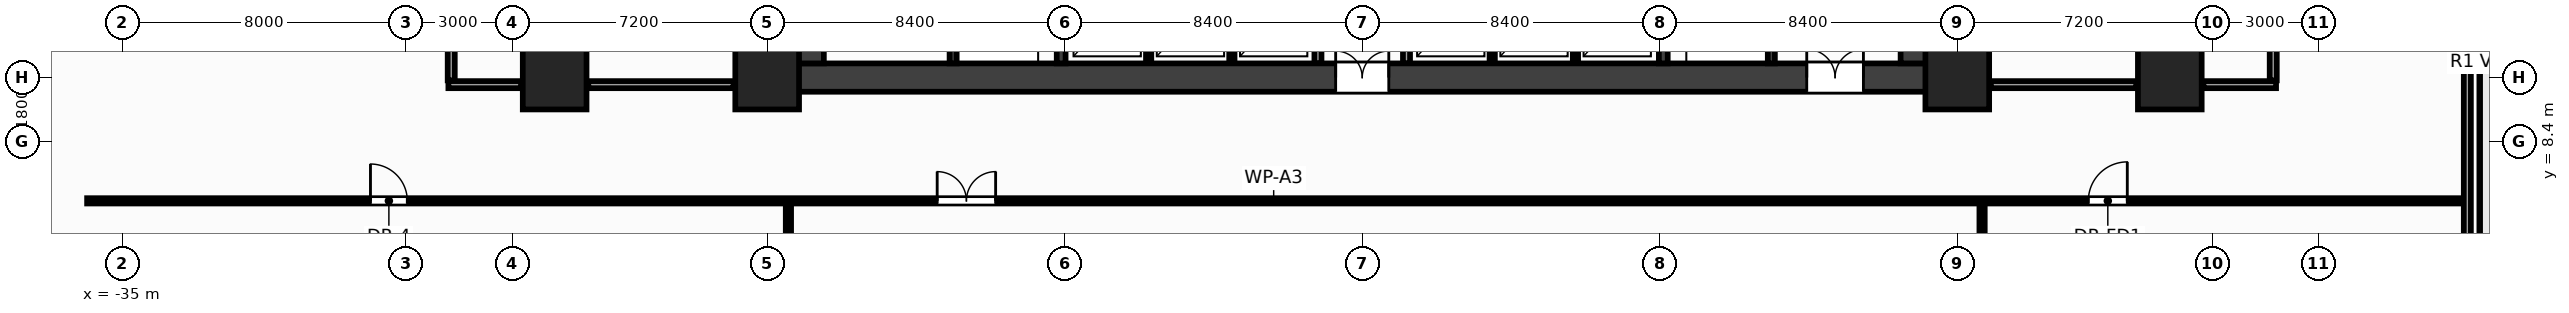
"""IFC4 building model, lengths in metres.
Left out: names, types, materials, properties, quantities, classifications, styles, units other than length and angle.
Written with IfcOpenShell. Run it as: python <this file> out.ifc"""

import sys

from ifc_helpers import new_model, si_unit, direction, frame, frame_2d, origin, origin_2d, place, context, subcontext, project, spatial, rectangle, extrude, source, transform, mapped, element, fill, save


model = new_model("IFC4")
c1 = context("Model", 3, precision=1e-05, world=origin(), true_north=direction((0.0, 1.0)))
c2 = subcontext(c1, "Body", "Model", "MODEL_VIEW")
j1 = project(units=[si_unit("LENGTHUNIT", "METRE"), si_unit("PLANEANGLEUNIT", "RADIAN")], contexts=[c1])
p1 = place(None, origin())
s1 = spatial("IfcSite", under=j1, at=p1, CompositionType="ELEMENT")
p2 = place(p1, origin())
s2 = spatial("IfcBuilding", under=s1, at=p2, CompositionType="ELEMENT")
p3 = place(p2, origin())
s3 = spatial("IfcBuildingStorey", under=s2, at=p3, CompositionType="ELEMENT", Elevation=0.0)
m1 = source(origin(), c2, "Body", "SweptSolid", [
    extrude(rectangle(XDim=32.0, YDim=0.8, at=frame_2d((16.0, 0.0))), origin(), (0.0, 0.0, 1.0), 5.0),
])
p4 = place(p3, frame((-16.0, 10.2, 0.0), z_axis=(0.0, 0.0, 1.0), x_axis=(1.0, 0.0, 0.0)))
e1 = element("IfcWall", 1, at=p4, inside=s3, PredefinedType="SHEAR", context=c2, shape_type="MappedRepresentation", body=[
    mapped(m1, transform((0.0, 0.0, 0.0), x_axis=(1.0, 0.0, 0.0), y_axis=(0.0, 1.0, 0.0), z_axis=(0.0, 0.0, 1.0), scale=1.0)),
])
p5 = place(p4, frame((28.55, 0.0, 0.0)))
e2 = element("IfcOpeningElement", 2, at=p5, cuts=e1, PredefinedType="OPENING", context=c2, shape_type="SweptSolid", body=[
    extrude(rectangle(XDim=1.6, YDim=2.15, at=frame_2d((0.8, 1.075))), frame((0.0, 0.412, 0.0), z_axis=(0.0, -1.0, 0.0), x_axis=(1.0, 0.0, 0.0)), (0.0, 0.0, 1.0), 0.824),
])
p6 = place(p4, frame((15.25, 0.0, 0.0)))
e3 = element("IfcOpeningElement", 3, at=p6, cuts=e1, PredefinedType="OPENING", context=c2, shape_type="SweptSolid", body=[
    extrude(rectangle(XDim=1.5, YDim=2.2, at=frame_2d((0.75, 1.1))), frame((0.0, 0.412, 0.0), z_axis=(0.0, -1.0, 0.0), x_axis=(1.0, 0.0, 0.0)), (0.0, 0.0, 1.0), 0.824),
])
m2 = source(origin(), c2, "Body", "SweptSolid", [
    extrude(rectangle(XDim=12.8, YDim=0.8, at=frame_2d((6.4, 0.0))), origin(), (0.0, 0.0, 1.0), 5.0),
])
p7 = place(p3, frame((-15.6, 10.6, 0.0), z_axis=(0.0, 0.0, 1.0), x_axis=(0.0, 1.0, 0.0)))
e4 = element("IfcWall", 4, at=p7, inside=s3, PredefinedType="SHEAR", context=c2, shape_type="MappedRepresentation", body=[
    mapped(m2, transform((0.0, 0.0, 0.0), x_axis=(1.0, 0.0, 0.0), y_axis=(0.0, 1.0, 0.0), z_axis=(0.0, 0.0, 1.0), scale=1.0)),
])
p8 = place(p7, frame((0.55, 0.0, 0.0)))
e5 = element("IfcOpeningElement", 5, at=p8, cuts=e4, PredefinedType="OPENING", context=c2, shape_type="SweptSolid", body=[
    extrude(rectangle(XDim=1.6, YDim=2.15, at=frame_2d((0.8, 1.075))), frame((0.0, 0.412, 0.0), z_axis=(0.0, -1.0, 0.0), x_axis=(1.0, 0.0, 0.0)), (0.0, 0.0, 1.0), 0.824),
])
p9 = place(p3, frame((15.6, 10.6, 0.0), z_axis=(0.0, 0.0, 1.0), x_axis=(0.0, 1.0, 0.0)))
e6 = element("IfcWall", 6, at=p9, inside=s3, PredefinedType="SHEAR", context=c2, shape_type="MappedRepresentation", body=[
    mapped(m2, transform((0.0, 0.0, 0.0), x_axis=(1.0, 0.0, 0.0), y_axis=(0.0, 1.0, 0.0), z_axis=(0.0, 0.0, 1.0), scale=1.0)),
])
p10 = place(p9, frame((0.55, 0.0, 0.0)))
e7 = element("IfcOpeningElement", 7, at=p10, cuts=e6, PredefinedType="OPENING", context=c2, shape_type="SweptSolid", body=[
    extrude(rectangle(XDim=1.6, YDim=2.15, at=frame_2d((0.8, 1.075))), frame((0.0, 0.412, 0.0), z_axis=(0.0, -1.0, 0.0), x_axis=(1.0, 0.0, 0.0)), (0.0, 0.0, 1.0), 0.824),
])
m3 = source(origin(), c2, "Body", "SweptSolid", [
    extrude(rectangle(XDim=12.8, YDim=0.25, at=frame_2d((6.4, 0.0))), origin(), (0.0, 0.0, 1.0), 5.0),
])
p11 = place(p3, frame((-8.5, 10.6, 0.0), z_axis=(0.0, 0.0, 1.0), x_axis=(0.0, 1.0, 0.0)))
e8 = element("IfcWall", 8, at=p11, inside=s3, PredefinedType="SHEAR", context=c2, shape_type="MappedRepresentation", body=[
    mapped(m3, transform((0.0, 0.0, 0.0), x_axis=(1.0, 0.0, 0.0), y_axis=(0.0, 1.0, 0.0), z_axis=(0.0, 0.0, 1.0), scale=1.0)),
])
p12 = place(p11, frame((5.0, 0.0, 0.0)))
e9 = element("IfcOpeningElement", 9, at=p12, cuts=e8, PredefinedType="OPENING", context=c2, shape_type="SweptSolid", body=[
    extrude(rectangle(XDim=0.95, YDim=2.15, at=frame_2d((0.475, 1.075))), frame((0.0, 0.137, 0.0), z_axis=(0.0, -1.0, 0.0), x_axis=(1.0, 0.0, 0.0)), (0.0, 0.0, 1.0), 0.274),
])
p13 = place(p11, frame((8.1, 0.0, 0.0)))
e10 = element("IfcOpeningElement", 10, at=p13, cuts=e8, PredefinedType="OPENING", context=c2, shape_type="SweptSolid", body=[
    extrude(rectangle(XDim=0.95, YDim=2.15, at=frame_2d((0.475, 1.075))), frame((0.0, 0.137, 0.0), z_axis=(0.0, -1.0, 0.0), x_axis=(1.0, 0.0, 0.0)), (0.0, 0.0, 1.0), 0.274),
])
p14 = place(p3, frame((8.5, 10.6, 0.0), z_axis=(0.0, 0.0, 1.0), x_axis=(0.0, 1.0, 0.0)))
e11 = element("IfcWall", 11, at=p14, inside=s3, PredefinedType="SHEAR", context=c2, shape_type="MappedRepresentation", body=[
    mapped(m3, transform((0.0, 0.0, 0.0), x_axis=(1.0, 0.0, 0.0), y_axis=(0.0, 1.0, 0.0), z_axis=(0.0, 0.0, 1.0), scale=1.0)),
])
p15 = place(p14, frame((4.4, 0.0, 0.0)))
e12 = element("IfcOpeningElement", 12, at=p15, cuts=e11, PredefinedType="OPENING", context=c2, shape_type="SweptSolid", body=[
    extrude(rectangle(XDim=1.1, YDim=2.15, at=frame_2d((0.55, 1.075))), frame((0.0, 0.137, 0.0), z_axis=(0.0, -1.0, 0.0), x_axis=(1.0, 0.0, 0.0)), (0.0, 0.0, 1.0), 0.274),
])
p16 = place(p14, frame((6.95, 0.0, 0.0)))
e13 = element("IfcOpeningElement", 13, at=p16, cuts=e11, PredefinedType="OPENING", context=c2, shape_type="SweptSolid", body=[
    extrude(rectangle(XDim=1.1, YDim=2.15, at=frame_2d((0.55, 1.075))), frame((0.0, 0.137, 0.0), z_axis=(0.0, -1.0, 0.0), x_axis=(1.0, 0.0, 0.0)), (0.0, 0.0, 1.0), 0.274),
])
p17 = place(p14, frame((9.85, 0.0, 0.0)))
e14 = element("IfcOpeningElement", 14, at=p17, cuts=e11, PredefinedType="OPENING", context=c2, shape_type="SweptSolid", body=[
    extrude(rectangle(XDim=0.95, YDim=2.15, at=frame_2d((0.475, 1.075))), frame((0.0, 0.137, 0.0), z_axis=(0.0, -1.0, 0.0), x_axis=(1.0, 0.0, 0.0)), (0.0, 0.0, 1.0), 0.274),
])
m4 = source(origin(), c2, "Body", "SweptSolid", [
    extrude(rectangle(XDim=3.05, YDim=0.2, at=frame_2d((1.525, 0.0))), origin(), (0.0, 0.0, 1.0), 5.0),
])
p18 = place(p3, frame((-11.55, 10.6, 0.0), z_axis=(0.0, 0.0, 1.0), x_axis=(0.0, 1.0, 0.0)))
e15 = element("IfcWall", 15, at=p18, inside=s3, PredefinedType="SHEAR", context=c2, shape_type="MappedRepresentation", body=[
    mapped(m4, transform((0.0, 0.0, 0.0), x_axis=(1.0, 0.0, 0.0), y_axis=(0.0, 1.0, 0.0), z_axis=(0.0, 0.0, 1.0), scale=1.0)),
])
p19 = place(p18, frame((0.9, 0.0, 0.0)))
e16 = element("IfcOpeningElement", 16, at=p19, cuts=e15, PredefinedType="OPENING", context=c2, shape_type="SweptSolid", body=[
    extrude(rectangle(XDim=1.1, YDim=2.15, at=frame_2d((0.55, 1.075))), frame((0.0, 0.112, 0.0), z_axis=(0.0, -1.0, 0.0), x_axis=(1.0, 0.0, 0.0)), (0.0, 0.0, 1.0), 0.224),
])
p20 = place(p3, frame((11.55, 10.6, 0.0), z_axis=(0.0, 0.0, 1.0), x_axis=(0.0, 1.0, 0.0)))
e17 = element("IfcWall", 17, at=p20, inside=s3, PredefinedType="SHEAR", context=c2, shape_type="MappedRepresentation", body=[
    mapped(m4, transform((0.0, 0.0, 0.0), x_axis=(1.0, 0.0, 0.0), y_axis=(0.0, 1.0, 0.0), z_axis=(0.0, 0.0, 1.0), scale=1.0)),
])
p21 = place(p20, frame((0.9, 0.0, 0.0)))
e18 = element("IfcOpeningElement", 18, at=p21, cuts=e17, PredefinedType="OPENING", context=c2, shape_type="SweptSolid", body=[
    extrude(rectangle(XDim=1.1, YDim=2.15, at=frame_2d((0.55, 1.075))), frame((0.0, 0.112, 0.0), z_axis=(0.0, -1.0, 0.0), x_axis=(1.0, 0.0, 0.0)), (0.0, 0.0, 1.0), 0.224),
])
m5 = source(origin(), c2, "Body", "SweptSolid", [
    extrude(rectangle(XDim=1.8, YDim=1.8, at=origin_2d()), origin(), (0.0, 0.0, 1.0), 5.0),
])
for number, where, z_axis, x_axis in (
    (19, (-16.8, 10.2, 0.0), (0.0, 0.0, 1.0), (1.0, 0.0, 0.0)),
    (20, (16.8, 10.2, 0.0), (0.0, 0.0, 1.0), (1.0, 0.0, 0.0)),
    (21, (-22.8, 10.2, 0.0), (0.0, 0.0, 1.0), (1.0, 0.0, 0.0)),
    (22, (22.8, 10.2, 0.0), (0.0, 0.0, 1.0), (1.0, 0.0, 0.0)),
):
    element("IfcColumn", number, at=place(p3, frame(where, z_axis=z_axis, x_axis=x_axis)), inside=s3, PredefinedType="COLUMN", context=c2, shape_type="MappedRepresentation", body=[
        mapped(m5, transform((0.0, 0.0, 0.0), x_axis=(1.0, 0.0, 0.0), y_axis=(0.0, 1.0, 0.0), z_axis=(0.0, 0.0, 1.0), scale=1.0)),
    ])
m6 = source(origin(), c2, "Body", "SweptSolid", [
    extrude(rectangle(XDim=3.34, YDim=0.2, at=frame_2d((1.67, 0.0))), origin(), (0.0, 0.0, 1.0), 4.72),
])
for number, where, z_axis, x_axis in (
    (23, (-1.25, 10.6, 0.0), (0.0, 0.0, 1.0), (0.0, 1.0, 0.0)),
    (24, (1.25, 10.6, 0.0), (0.0, 0.0, 1.0), (0.0, 1.0, 0.0)),
):
    element("IfcWall", number, at=place(p3, frame(where, z_axis=z_axis, x_axis=x_axis)), inside=s3, PredefinedType="PARTITIONING", context=c2, shape_type="MappedRepresentation", body=[
        mapped(m6, transform((0.0, 0.0, 0.0), x_axis=(1.0, 0.0, 0.0), y_axis=(0.0, 1.0, 0.0), z_axis=(0.0, 0.0, 1.0), scale=1.0)),
    ])
m7 = source(origin(), c2, "Body", "SweptSolid", [
    extrude(rectangle(XDim=3.34, YDim=0.15, at=frame_2d((1.67, 0.0))), origin(), (0.0, 0.0, 1.0), 4.72),
])
for number, where, z_axis, x_axis in (
    (25, (-6.03, 10.6, 0.0), (0.0, 0.0, 1.0), (0.0, 1.0, 0.0)),
    (26, (-3.68, 10.6, 0.0), (0.0, 0.0, 1.0), (0.0, 1.0, 0.0)),
    (27, (3.67, 10.6, 0.0), (0.0, 0.0, 1.0), (0.0, 1.0, 0.0)),
    (28, (6.02, 10.6, 0.0), (0.0, 0.0, 1.0), (0.0, 1.0, 0.0)),
):
    element("IfcWall", number, at=place(p3, frame(where, z_axis=z_axis, x_axis=x_axis)), inside=s3, PredefinedType="PARTITIONING", context=c2, shape_type="MappedRepresentation", body=[
        mapped(m7, transform((0.0, 0.0, 0.0), x_axis=(1.0, 0.0, 0.0), y_axis=(0.0, 1.0, 0.0), z_axis=(0.0, 0.0, 1.0), scale=1.0)),
    ])
m8 = source(origin(), c2, "Body", "SweptSolid", [
    extrude(rectangle(XDim=67.0, YDim=0.15, at=frame_2d((33.5, 0.0))), origin(), (0.0, 0.0, 1.0), 4.105),
])
p22 = place(p3, frame((-36.0, 6.72, 0.0), z_axis=(0.0, 0.0, 1.0), x_axis=(1.0, 0.0, 0.0)))
e29 = element("IfcWall", 29, at=p22, inside=s3, PredefinedType="PARTITIONING", context=c2, shape_type="MappedRepresentation", body=[
    mapped(m8, transform((0.0, 0.0, 0.0), x_axis=(1.0, 0.0, 0.0), y_axis=(0.0, 1.0, 0.0), z_axis=(0.0, 0.0, 1.0), scale=1.0)),
])
p23 = place(p22, frame((24.0, 0.0, 0.0)))
e30 = element("IfcOpeningElement", 30, at=p23, cuts=e29, PredefinedType="OPENING", context=c2, shape_type="SweptSolid", body=[
    extrude(rectangle(XDim=1.65, YDim=2.35, at=frame_2d((0.825, 1.175))), frame((0.0, 0.087, 0.0), z_axis=(0.0, -1.0, 0.0), x_axis=(1.0, 0.0, 0.0)), (0.0, 0.0, 1.0), 0.174),
])
p24 = place(p22, frame((8.0, 0.0, 0.0)))
e31 = element("IfcOpeningElement", 31, at=p24, cuts=e29, PredefinedType="OPENING", context=c2, shape_type="SweptSolid", body=[
    extrude(rectangle(XDim=1.04, YDim=2.2, at=frame_2d((0.52, 1.1))), frame((0.0, 0.087, 0.0), z_axis=(0.0, -1.0, 0.0), x_axis=(1.0, 0.0, 0.0)), (0.0, 0.0, 1.0), 0.174),
])
p25 = place(p22, frame((56.5, 0.0, 0.0)))
e32 = element("IfcOpeningElement", 32, at=p25, cuts=e29, PredefinedType="OPENING", context=c2, shape_type="SweptSolid", body=[
    extrude(rectangle(XDim=1.1, YDim=2.15, at=frame_2d((0.55, 1.075))), frame((0.0, 0.087, 0.0), z_axis=(0.0, -1.0, 0.0), x_axis=(1.0, 0.0, 0.0)), (0.0, 0.0, 1.0), 0.174),
])
m9 = source(origin(), c2, "Body", "SweptSolid", [
    extrude(rectangle(XDim=31.55, YDim=0.15, at=frame_2d((15.775, 0.0))), origin(), (0.0, 0.0, 1.0), 4.105),
])
for number, where, z_axis, x_axis in (
    (33, (-16.2, -25.0, 0.0), (0.0, 0.0, 1.0), (0.0, 1.0, 0.0)),
    (34, (17.5, -25.0, 0.0), (0.0, 0.0, 1.0), (0.0, 1.0, 0.0)),
):
    element("IfcWall", number, at=place(p3, frame(where, z_axis=z_axis, x_axis=x_axis)), inside=s3, PredefinedType="PARTITIONING", context=c2, shape_type="MappedRepresentation", body=[
        mapped(m9, transform((0.0, 0.0, 0.0), x_axis=(1.0, 0.0, 0.0), y_axis=(0.0, 1.0, 0.0), z_axis=(0.0, 0.0, 1.0), scale=1.0)),
    ])
m10 = source(origin(), c2, "Body", "SweptSolid", [
    extrude(rectangle(XDim=51.5, YDim=0.2, at=frame_2d((25.75, 0.0))), origin(), (0.0, 0.0, 1.0), 4.72),
])
p26 = place(p3, frame((31.2, -25.0, 0.0), z_axis=(0.0, 0.0, 1.0), x_axis=(0.0, 1.0, 0.0)))
e35 = element("IfcWall", 35, at=p26, inside=s3, PredefinedType="PARTITIONING", context=c2, shape_type="MappedRepresentation", body=[
    mapped(m10, transform((0.0, 0.0, 0.0), x_axis=(1.0, 0.0, 0.0), y_axis=(0.0, 1.0, 0.0), z_axis=(0.0, 0.0, 1.0), scale=1.0)),
])
m11 = source(origin(), c2, "Body", "SweptSolid", [
    extrude(rectangle(XDim=16.5, YDim=0.2, at=frame_2d((8.25, 0.0))), origin(), (0.0, 0.0, 1.0), 4.72),
])
p27 = place(p3, frame((-25.72, 10.12, 0.0), z_axis=(0.0, 0.0, 1.0), x_axis=(0.0, 1.0, 0.0)))
e36 = element("IfcWall", 36, at=p27, inside=s3, PredefinedType="PARTITIONING", context=c2, shape_type="MappedRepresentation", body=[
    mapped(m11, transform((0.0, 0.0, 0.0), x_axis=(1.0, 0.0, 0.0), y_axis=(0.0, 1.0, 0.0), z_axis=(0.0, 0.0, 1.0), scale=1.0)),
])
m12 = source(origin(), c2, "Body", "SweptSolid", [
    extrude(rectangle(XDim=2.05, YDim=0.2, at=frame_2d((1.025, 0.0))), origin(), (0.0, 0.0, 1.0), 4.72),
])
p28 = place(p3, frame((-25.8, 10.0, 0.0), z_axis=(0.0, 0.0, 1.0), x_axis=(1.0, 0.0, 0.0)))
e37 = element("IfcWall", 37, at=p28, inside=s3, PredefinedType="PARTITIONING", context=c2, shape_type="MappedRepresentation", body=[
    mapped(m12, transform((0.0, 0.0, 0.0), x_axis=(1.0, 0.0, 0.0), y_axis=(0.0, 1.0, 0.0), z_axis=(0.0, 0.0, 1.0), scale=1.0)),
])
m13 = source(origin(), c2, "Body", "SweptSolid", [
    extrude(rectangle(XDim=4.1, YDim=0.2, at=frame_2d((2.05, 0.0))), origin(), (0.0, 0.0, 1.0), 4.105),
])
p29 = place(p3, frame((-21.85, 10.0, 0.0), z_axis=(0.0, 0.0, 1.0), x_axis=(1.0, 0.0, 0.0)))
e38 = element("IfcWall", 38, at=p29, inside=s3, PredefinedType="PARTITIONING", context=c2, shape_type="MappedRepresentation", body=[
    mapped(m13, transform((0.0, 0.0, 0.0), x_axis=(1.0, 0.0, 0.0), y_axis=(0.0, 1.0, 0.0), z_axis=(0.0, 0.0, 1.0), scale=1.0)),
])
p30 = place(p3, frame((25.72, 10.12, 0.0), z_axis=(0.0, 0.0, 1.0), x_axis=(0.0, 1.0, 0.0)))
e39 = element("IfcWall", 39, at=p30, inside=s3, PredefinedType="PARTITIONING", context=c2, shape_type="MappedRepresentation", body=[
    mapped(m11, transform((0.0, 0.0, 0.0), x_axis=(1.0, 0.0, 0.0), y_axis=(0.0, 1.0, 0.0), z_axis=(0.0, 0.0, 1.0), scale=1.0)),
])
p31 = place(p3, frame((17.75, 10.0, 0.0), z_axis=(0.0, 0.0, 1.0), x_axis=(1.0, 0.0, 0.0)))
e40 = element("IfcWall", 40, at=p31, inside=s3, PredefinedType="PARTITIONING", context=c2, shape_type="MappedRepresentation", body=[
    mapped(m13, transform((0.0, 0.0, 0.0), x_axis=(1.0, 0.0, 0.0), y_axis=(0.0, 1.0, 0.0), z_axis=(0.0, 0.0, 1.0), scale=1.0)),
])
p32 = place(p3, frame((23.75, 10.0, 0.0), z_axis=(0.0, 0.0, 1.0), x_axis=(1.0, 0.0, 0.0)))
e41 = element("IfcWall", 41, at=p32, inside=s3, PredefinedType="PARTITIONING", context=c2, shape_type="MappedRepresentation", body=[
    mapped(m12, transform((0.0, 0.0, 0.0), x_axis=(1.0, 0.0, 0.0), y_axis=(0.0, 1.0, 0.0), z_axis=(0.0, 0.0, 1.0), scale=1.0)),
])
m14 = source(origin(), c2, "Body", "SweptSolid", [
    extrude(rectangle(XDim=1.6, YDim=2.15, at=frame_2d((0.8, 1.075))), frame((0.0, 0.025, 0.0), z_axis=(0.0, -1.0, 0.0), x_axis=(1.0, 0.0, 0.0)), (0.0, 0.0, 1.0), 0.05),
])
p33 = place(p5, origin())
e42 = element("IfcDoor", 42, at=p33, inside=s3, OperationType="DOUBLE_DOOR_SINGLE_SWING", PredefinedType="DOOR", context=c2, shape_type="MappedRepresentation", body=[
    mapped(m14, transform((0.0, 0.0, 0.0), x_axis=(1.0, 0.0, 0.0), y_axis=(0.0, 1.0, 0.0), z_axis=(0.0, 0.0, 1.0), scale=1.0)),
])
fill(e2, e42)
m15 = source(origin(), c2, "Body", "SweptSolid", [
    extrude(rectangle(XDim=1.5, YDim=2.2, at=frame_2d((0.75, 1.1))), frame((0.0, 0.025, 0.0), z_axis=(0.0, -1.0, 0.0), x_axis=(1.0, 0.0, 0.0)), (0.0, 0.0, 1.0), 0.05),
])
p34 = place(p6, origin())
e43 = element("IfcDoor", 43, at=p34, inside=s3, OperationType="DOUBLE_DOOR_SINGLE_SWING", PredefinedType="DOOR", context=c2, shape_type="MappedRepresentation", body=[
    mapped(m15, transform((0.0, 0.0, 0.0), x_axis=(1.0, 0.0, 0.0), y_axis=(0.0, 1.0, 0.0), z_axis=(0.0, 0.0, 1.0), scale=1.0)),
])
fill(e3, e43)
m16 = source(origin(), c2, "Body", "SweptSolid", [
    extrude(rectangle(XDim=1.65, YDim=2.35, at=frame_2d((0.825, 1.175))), frame((0.0, 0.025, 0.0), z_axis=(0.0, -1.0, 0.0), x_axis=(1.0, 0.0, 0.0)), (0.0, 0.0, 1.0), 0.05),
])
p35 = place(p23, origin())
e44 = element("IfcDoor", 44, at=p35, inside=s3, OperationType="DOUBLE_DOOR_SINGLE_SWING", PredefinedType="DOOR", context=c2, shape_type="MappedRepresentation", body=[
    mapped(m16, transform((0.0, 0.0, 0.0), x_axis=(1.0, 0.0, 0.0), y_axis=(0.0, 1.0, 0.0), z_axis=(0.0, 0.0, 1.0), scale=1.0)),
])
fill(e30, e44)
m17 = source(origin(), c2, "Body", "SweptSolid", [
    extrude(rectangle(XDim=1.04, YDim=2.2, at=frame_2d((0.52, 1.1))), frame((0.0, 0.025, 0.0), z_axis=(0.0, -1.0, 0.0), x_axis=(1.0, 0.0, 0.0)), (0.0, 0.0, 1.0), 0.05),
])
p36 = place(p24, origin())
e45 = element("IfcDoor", 45, at=p36, inside=s3, OperationType="SINGLE_SWING_LEFT", PredefinedType="DOOR", context=c2, shape_type="MappedRepresentation", body=[
    mapped(m17, transform((0.0, 0.0, 0.0), x_axis=(1.0, 0.0, 0.0), y_axis=(0.0, 1.0, 0.0), z_axis=(0.0, 0.0, 1.0), scale=1.0)),
])
fill(e31, e45)
m18 = source(origin(), c2, "Body", "SweptSolid", [
    extrude(rectangle(XDim=1.1, YDim=2.15, at=frame_2d((0.55, 1.075))), frame((0.0, 0.025, 0.0), z_axis=(0.0, -1.0, 0.0), x_axis=(1.0, 0.0, 0.0)), (0.0, 0.0, 1.0), 0.05),
])
p37 = place(p25, origin())
e46 = element("IfcDoor", 46, at=p37, inside=s3, OperationType="SINGLE_SWING_RIGHT", PredefinedType="DOOR", context=c2, shape_type="MappedRepresentation", body=[
    mapped(m18, transform((0.0, 0.0, 0.0), x_axis=(1.0, 0.0, 0.0), y_axis=(0.0, 1.0, 0.0), z_axis=(0.0, 0.0, 1.0), scale=1.0)),
])
fill(e32, e46)
save(model, sys.argv[1])
